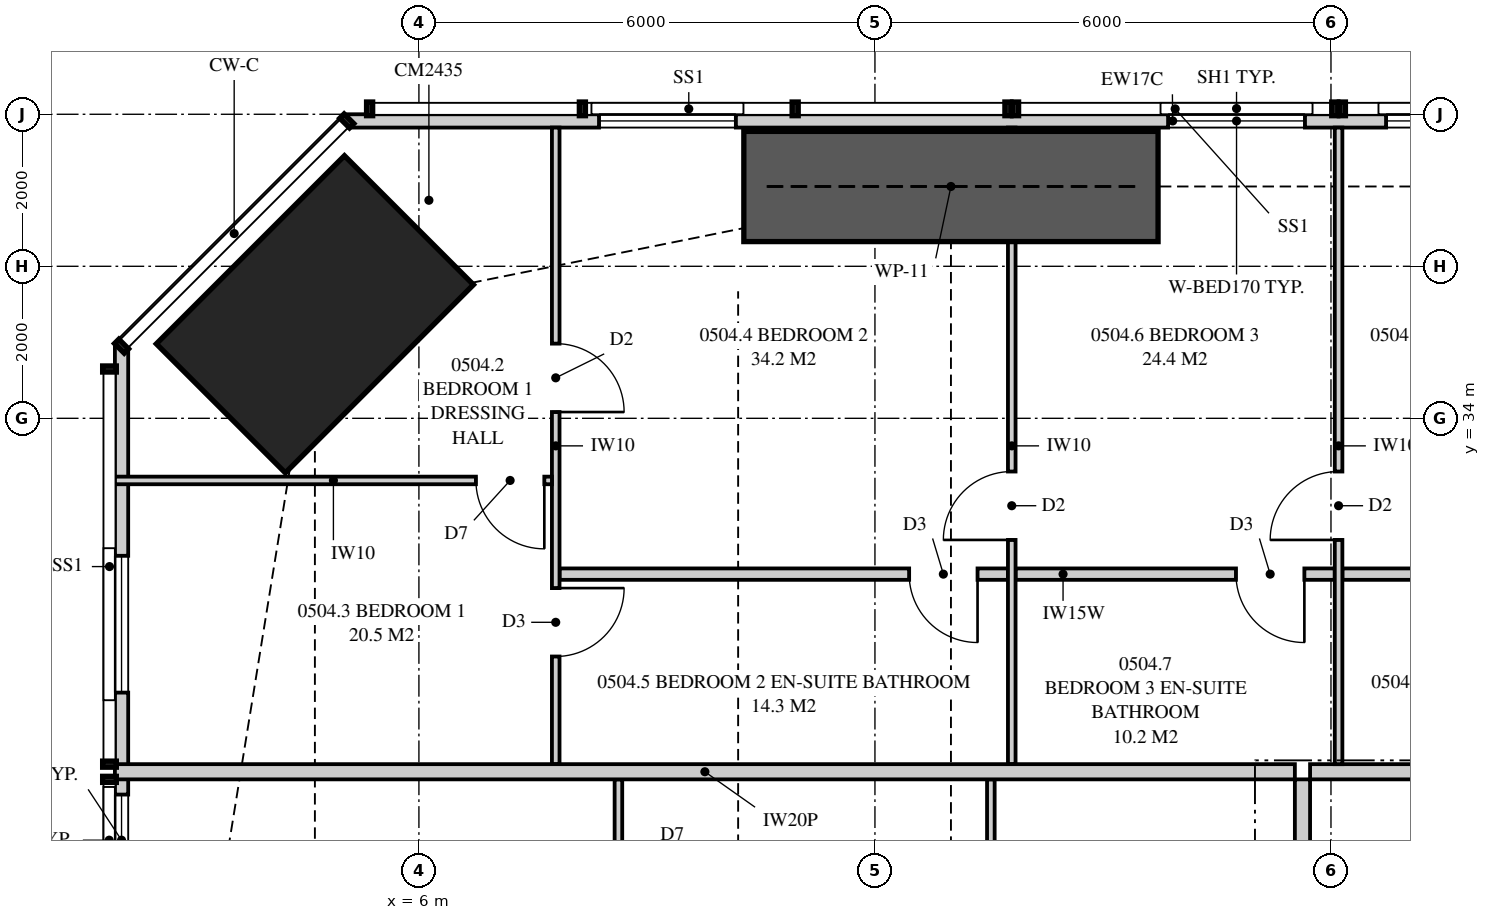
"""IFC4 building model, lengths in metres.
Left out: names, types, materials, properties, quantities, classifications, styles, units other than length and angle.
Written with IfcOpenShell. Run it as: python <this file> out.ifc"""

import sys

from ifc_helpers import new_model, si_unit, direction, frame, frame_2d, origin, origin_2d, place, context, subcontext, project, spatial, polyline, rectangle, outline, extrude, element, fill, save


model = new_model("IFC4")
c1 = context("Model", 3, precision=1e-05, world=origin(), true_north=direction((0.0, 1.0)))
c2 = subcontext(c1, "Body", "Model", "MODEL_VIEW")
j1 = project(units=[si_unit("LENGTHUNIT", "METRE"), si_unit("PLANEANGLEUNIT", "RADIAN")], contexts=[c1])
p1 = place(None, origin())
s1 = spatial("IfcSite", under=j1, at=p1, CompositionType="ELEMENT")
p2 = place(p1, origin())
s2 = spatial("IfcBuilding", under=s1, at=p2, CompositionType="ELEMENT")
p3 = place(p2, frame((0.0, 0.0, 24.35)))
s3 = spatial("IfcBuildingStorey", under=s2, at=p3, CompositionType="ELEMENT", Elevation=24.35)
p4 = place(p3, frame((4.631, 35.369, 0.0), z_axis=(0.0, 0.0, 1.0), x_axis=(0.707106781187, -0.707106781187, 0.0)))
e1 = element("IfcColumn", 1, at=p4, inside=s3, PredefinedType="COLUMN", context=c2, shape_type="SweptSolid", body=[
    extrude(rectangle(XDim=2.4, YDim=3.5, at=origin_2d()), origin(), (0.0, 0.0, 1.0), 3.35),
])
p5 = place(p3, frame((26.783, 37.913, 0.0), z_axis=(0.0, 0.0, 1.0), x_axis=(-1.0, 0.0, 0.0)))
e2 = element("IfcWall", 2, at=p5, inside=s3, PredefinedType="SOLIDWALL", context=c2, shape_type="SweptSolid", body=[
    extrude(outline(polyline([(0.0, 0.0), (21.732, 0.0), (21.732, 3.11), (13.987, 3.11), (13.987, 2.15), (13.939, 2.15), (13.939, 3.11), (13.783, 3.11), (13.783, 2.15), (0.0, 2.15), (0.0, 0.0)])), frame((0.0, 0.087, 0.0), z_axis=(0.0, -1.0, 0.0), x_axis=(1.0, 0.0, 0.0)), (0.0, 0.0, 1.0), 0.175),
])
p6 = place(p5, frame((6.258, 0.0, 0.4)))
e3 = element("IfcOpeningElement", 3, at=p6, cuts=e2, PredefinedType="OPENING", context=c2, shape_type="SweptSolid", body=[
    extrude(rectangle(XDim=1.8, YDim=1.7, at=frame_2d((0.9, 0.85))), frame((0.0, 0.097, 0.0), z_axis=(0.0, -1.0, 0.0), x_axis=(1.0, 0.0, 0.0)), (0.0, 0.0, 1.0), 0.195),
])
p7 = place(p5, frame((9.126, 0.0, 0.4)))
e4 = element("IfcOpeningElement", 4, at=p7, cuts=e2, PredefinedType="OPENING", context=c2, shape_type="SweptSolid", body=[
    extrude(rectangle(XDim=1.8, YDim=1.7, at=frame_2d((0.9, 0.85))), frame((0.0, 0.097, 0.0), z_axis=(0.0, -1.0, 0.0), x_axis=(1.0, 0.0, 0.0)), (0.0, 0.0, 1.0), 0.195),
])
p8 = place(p5, frame((16.613, 0.0, 0.4)))
e5 = element("IfcOpeningElement", 5, at=p8, cuts=e2, PredefinedType="OPENING", context=c2, shape_type="SweptSolid", body=[
    extrude(rectangle(XDim=1.8, YDim=1.7, at=frame_2d((0.9, 0.85))), frame((0.0, 0.097, 0.0), z_axis=(0.0, -1.0, 0.0), x_axis=(1.0, 0.0, 0.0)), (0.0, 0.0, 1.0), 0.195),
])
p9 = place(p3, frame((2.087, 34.949, 0.0), z_axis=(0.0, 0.0, 1.0), x_axis=(0.0, -1.0, 0.0)))
e6 = element("IfcWall", 6, at=p9, inside=s3, PredefinedType="SOLIDWALL", context=c2, shape_type="SweptSolid", body=[
    extrude(outline(polyline([(0.0, 0.0), (14.557, 0.0), (14.557, 2.15), (9.949, 2.15), (9.949, 3.11), (9.823, 3.11), (9.823, 2.15), (9.73, 2.15), (9.73, 3.11), (0.0, 3.11), (0.0, 0.0)])), frame((0.0, 0.087, 0.0), z_axis=(0.0, -1.0, 0.0), x_axis=(1.0, 0.0, 0.0)), (0.0, 0.0, 1.0), 0.175),
])
p10 = place(p9, frame((2.757, 0.0, 0.4)))
e7 = element("IfcOpeningElement", 7, at=p10, cuts=e6, PredefinedType="OPENING", context=c2, shape_type="SweptSolid", body=[
    extrude(rectangle(XDim=1.8, YDim=1.7, at=frame_2d((0.9, 0.85))), frame((0.0, 0.097, 0.0), z_axis=(0.0, -1.0, 0.0), x_axis=(1.0, 0.0, 0.0)), (0.0, 0.0, 1.0), 0.195),
])
p11 = place(p9, frame((5.899, 0.0, 0.4)))
e8 = element("IfcOpeningElement", 8, at=p11, cuts=e6, PredefinedType="OPENING", context=c2, shape_type="SweptSolid", body=[
    extrude(rectangle(XDim=1.2, YDim=1.7, at=frame_2d((0.6, 0.85))), frame((0.0, 0.097, 0.0), z_axis=(0.0, -1.0, 0.0), x_axis=(1.0, 0.0, 0.0)), (0.0, 0.0, 1.0), 0.195),
])
p12 = place(p3, frame((17.725, 29.35, 0.0), z_axis=(0.0, 0.0, 1.0), x_axis=(1.0, 0.0, 0.0)))
e9 = element("IfcWall", 9, at=p12, inside=s3, PredefinedType="PARTITIONING", context=c2, shape_type="SweptSolid", body=[
    extrude(rectangle(XDim=3.525, YDim=0.2, at=frame_2d((1.762, 0.0))), origin(), (0.0, 0.0, 1.0), 3.11),
])
p13 = place(p3, frame((7.8, 37.825, 0.0), z_axis=(0.0, 0.0, 1.0), x_axis=(0.0, -1.0, 0.0)))
e10 = element("IfcWall", 10, at=p13, inside=s3, PredefinedType="PARTITIONING", context=c2, shape_type="SweptSolid", body=[
    extrude(outline(polyline([(0.0, 0.0), (8.375, 0.0), (8.375, 3.11), (2.697, 3.11), (2.697, 2.15), (0.943, 2.15), (0.943, 3.11), (0.0, 3.11), (0.0, 0.0)])), frame((0.0, 0.05, 0.0), z_axis=(0.0, -1.0, 0.0), x_axis=(1.0, 0.0, 0.0)), (0.0, 0.0, 1.0), 0.1),
])
p14 = place(p13, frame((2.842, 0.0, 0.0)))
e11 = element("IfcOpeningElement", 11, at=p14, cuts=e10, PredefinedType="OPENING", context=c2, shape_type="SweptSolid", body=[
    extrude(rectangle(XDim=0.9, YDim=2.1, at=frame_2d((0.45, 1.05))), frame((0.0, 0.06, 0.0), z_axis=(0.0, -1.0, 0.0), x_axis=(1.0, 0.0, 0.0)), (0.0, 0.0, 1.0), 0.12),
])
p15 = place(p13, frame((6.059, 0.0, 0.0)))
e12 = element("IfcOpeningElement", 12, at=p15, cuts=e10, PredefinedType="OPENING", context=c2, shape_type="SweptSolid", body=[
    extrude(rectangle(XDim=0.9, YDim=2.1, at=frame_2d((0.45, 1.05))), frame((0.0, 0.06, 0.0), z_axis=(0.0, -1.0, 0.0), x_axis=(1.0, 0.0, 0.0)), (0.0, 0.0, 1.0), 0.12),
])
p16 = place(p3, frame((13.8, 37.825, 0.0), z_axis=(0.0, 0.0, 1.0), x_axis=(0.0, -1.0, 0.0)))
e13 = element("IfcWall", 13, at=p16, inside=s3, PredefinedType="PARTITIONING", context=c2, shape_type="SweptSolid", body=[
    extrude(outline(polyline([(1.635, 2.15), (0.0, 2.15), (0.0, 0.0), (8.375, 0.0), (8.375, 3.11), (1.635, 3.11), (1.635, 2.15)]), holes=[polyline([(1.021, 0.126), (0.529, 0.126), (0.529, 0.919), (1.021, 0.919), (1.021, 0.126)]), polyline([(1.021, 1.231), (0.529, 1.231), (0.529, 2.024), (1.021, 2.024), (1.021, 1.231)])]), frame((0.0, 0.05, 0.0), z_axis=(0.0, -1.0, 0.0), x_axis=(1.0, 0.0, 0.0)), (0.0, 0.0, 1.0), 0.1),
])
p17 = place(p16, frame((4.525, 0.0, 0.0)))
e14 = element("IfcOpeningElement", 14, at=p17, cuts=e13, PredefinedType="OPENING", context=c2, shape_type="SweptSolid", body=[
    extrude(rectangle(XDim=0.9, YDim=2.1, at=frame_2d((0.45, 1.05))), frame((0.0, 0.06, 0.0), z_axis=(0.0, -1.0, 0.0), x_axis=(1.0, 0.0, 0.0)), (0.0, 0.0, 1.0), 0.12),
])
p18 = place(p3, frame((18.1, 37.825, 0.0), z_axis=(0.0, 0.0, 1.0), x_axis=(0.0, -1.0, 0.0)))
e15 = element("IfcWall", 15, at=p18, inside=s3, PredefinedType="PARTITIONING", context=c2, shape_type="SweptSolid", body=[
    extrude(outline(polyline([(0.0, 0.0), (8.375, 0.0), (8.375, 3.11), (1.635, 3.11), (1.635, 2.15), (0.0, 2.15), (0.0, 3.11), (0.0, 0.0)])), frame((0.0, 0.05, 0.0), z_axis=(0.0, -1.0, 0.0), x_axis=(1.0, 0.0, 0.0)), (0.0, 0.0, 1.0), 0.1),
])
p19 = place(p18, frame((4.525, 0.0, 0.0)))
e16 = element("IfcOpeningElement", 16, at=p19, cuts=e15, PredefinedType="OPENING", context=c2, shape_type="SweptSolid", body=[
    extrude(rectangle(XDim=0.9, YDim=2.1, at=frame_2d((0.45, 1.05))), frame((0.0, 0.06, 0.0), z_axis=(0.0, -1.0, 0.0), x_axis=(1.0, 0.0, 0.0)), (0.0, 0.0, 1.0), 0.12),
])
p20 = place(p3, frame((2.0, 33.183, 0.0), z_axis=(0.0, 0.0, 1.0), x_axis=(1.0, 0.0, 0.0)))
e17 = element("IfcWall", 17, at=p20, inside=s3, PredefinedType="PARTITIONING", context=c2, shape_type="SweptSolid", body=[
    extrude(outline(polyline([(0.0, 0.0), (5.75, 0.0), (5.75, 3.11), (3.148, 3.11), (3.148, 2.15), (1.406, 2.15), (1.406, 3.11), (0.0, 3.11), (0.0, 0.0)])), frame((0.0, 0.05, 0.0), z_axis=(0.0, -1.0, 0.0), x_axis=(1.0, 0.0, 0.0)), (0.0, 0.0, 1.0), 0.1),
])
p21 = place(p20, frame((4.75, 0.0, 0.0)))
e18 = element("IfcOpeningElement", 18, at=p21, cuts=e17, PredefinedType="OPENING", context=c2, shape_type="SweptSolid", body=[
    extrude(rectangle(XDim=0.9, YDim=2.1, at=frame_2d((0.45, 1.05))), frame((0.0, 0.06, 0.0), z_axis=(0.0, -1.0, 0.0), x_axis=(1.0, 0.0, 0.0)), (0.0, 0.0, 1.0), 0.12),
])
p22 = place(p3, frame((7.85, 31.95, 0.0), z_axis=(0.0, 0.0, 1.0), x_axis=(1.0, 0.0, 0.0)))
e19 = element("IfcWall", 19, at=p22, inside=s3, PredefinedType="PLUMBINGWALL", context=c2, shape_type="SweptSolid", body=[
    extrude(outline(polyline([(0.0, 0.0), (5.9, 0.0), (5.9, 3.11), (5.462, 3.11), (5.462, 2.541), (4.838, 2.541), (4.838, 3.11), (3.635, 3.11), (3.635, 2.51), (1.065, 2.51), (1.065, 3.11), (0.0, 3.11), (0.0, 0.0)])), frame((0.0, 0.075, 0.0), z_axis=(0.0, -1.0, 0.0), x_axis=(1.0, 0.0, 0.0)), (0.0, 0.0, 1.0), 0.15),
])
p23 = place(p22, frame((4.6, 0.0, 0.0)))
e20 = element("IfcOpeningElement", 20, at=p23, cuts=e19, PredefinedType="OPENING", context=c2, shape_type="SweptSolid", body=[
    extrude(rectangle(XDim=0.9, YDim=2.1, at=frame_2d((0.45, 1.05))), frame((0.0, 0.085, 0.0), z_axis=(0.0, -1.0, 0.0), x_axis=(1.0, 0.0, 0.0)), (0.0, 0.0, 1.0), 0.17),
])
p24 = place(p3, frame((13.85, 31.95, 0.0), z_axis=(0.0, 0.0, 1.0), x_axis=(1.0, 0.0, 0.0)))
e21 = element("IfcWall", 21, at=p24, inside=s3, PredefinedType="PLUMBINGWALL", context=c2, shape_type="SweptSolid", body=[
    extrude(rectangle(XDim=4.2, YDim=0.15, at=frame_2d((2.1, 0.0))), origin(), (0.0, 0.0, 1.0), 3.11),
])
p25 = place(p24, frame((2.9, 0.0, 0.0)))
e22 = element("IfcOpeningElement", 22, at=p25, cuts=e21, PredefinedType="OPENING", context=c2, shape_type="SweptSolid", body=[
    extrude(rectangle(XDim=0.9, YDim=2.1, at=frame_2d((0.45, 1.05))), frame((0.0, 0.085, 0.0), z_axis=(0.0, -1.0, 0.0), x_axis=(1.0, 0.0, 0.0)), (0.0, 0.0, 1.0), 0.17),
])
p26 = place(p3, frame((18.15, 31.95, 0.0), z_axis=(0.0, 0.0, 1.0), x_axis=(1.0, 0.0, 0.0)))
e23 = element("IfcWall", 23, at=p26, inside=s3, PredefinedType="PLUMBINGWALL", context=c2, shape_type="SweptSolid", body=[
    extrude(rectangle(XDim=2.95, YDim=0.15, at=frame_2d((1.475, 0.0))), origin(), (0.0, 0.0, 1.0), 3.11),
])
p27 = place(p3, frame((2.0, 29.35, 0.0), z_axis=(0.0, 0.0, 1.0), x_axis=(1.0, 0.0, 0.0)))
e24 = element("IfcWall", 24, at=p27, inside=s3, PredefinedType="PARTITIONING", context=c2, shape_type="SweptSolid", body=[
    extrude(outline(polyline([(0.0, 0.0), (15.525, 0.0), (15.525, 3.11), (11.337, 3.11), (11.337, 2.541), (10.663, 2.541), (10.663, 3.11), (9.51, 3.11), (9.51, 2.51), (6.89, 2.51), (6.89, 3.11), (2.969, 3.11), (2.969, 2.541), (2.577, 2.541), (2.577, 2.15), (0.733, 2.15), (0.733, 3.11), (0.0, 3.11), (0.0, 0.0)])), frame((0.0, 0.1, 0.0), z_axis=(0.0, -1.0, 0.0), x_axis=(1.0, 0.0, 0.0)), (0.0, 0.0, 1.0), 0.2),
])
p28 = place(p3, frame((13.525, 11.3, 0.0), z_axis=(0.0, 0.0, 1.0), x_axis=(0.0, 1.0, 0.0)))
e25 = element("IfcWall", 25, at=p28, inside=s3, PredefinedType="PARTITIONING", context=c2, shape_type="SweptSolid", body=[
    extrude(outline(polyline([(0.0, 0.0), (17.95, 0.0), (17.95, 3.11), (13.987, 3.11), (13.987, 2.541), (13.413, 2.541), (13.413, 3.11), (1.987, 3.11), (1.987, 2.541), (1.413, 2.541), (1.413, 3.11), (0.0, 3.11), (0.0, 0.0)])), frame((0.0, 0.05, 0.0), z_axis=(0.0, -1.0, 0.0), x_axis=(1.0, 0.0, 0.0)), (0.0, 0.0, 1.0), 0.1),
])
p29 = place(p28, frame((6.7, 0.0, 0.0)))
e26 = element("IfcOpeningElement", 26, at=p29, cuts=e25, PredefinedType="OPENING", context=c2, shape_type="SweptSolid", body=[
    extrude(rectangle(XDim=1.0, YDim=2.1, at=frame_2d((0.5, 1.05))), frame((0.0, 0.06, 0.0), z_axis=(0.0, -1.0, 0.0), x_axis=(1.0, 0.0, 0.0)), (0.0, 0.0, 1.0), 0.12),
])
p30 = place(p3, frame((17.625, 19.9, 0.0), z_axis=(0.0, 0.0, 1.0), x_axis=(0.0, 1.0, 0.0)))
e27 = element("IfcWall", 27, at=p30, inside=s3, PredefinedType="PARTITIONING", context=c2, shape_type="SweptSolid", body=[
    extrude(outline(polyline([(0.0, 0.0), (9.35, 0.0), (9.35, 3.11), (5.437, 3.11), (5.437, 2.541), (4.763, 2.541), (4.763, 3.11), (0.0, 3.11), (0.0, 0.0)])), frame((0.0, 0.1, 0.0), z_axis=(0.0, -1.0, 0.0), x_axis=(1.0, 0.0, 0.0)), (0.0, 0.0, 1.0), 0.2),
])
p31 = place(p3, frame((8.625, 23.317, 0.0), z_axis=(0.0, 0.0, 1.0), x_axis=(0.0, 1.0, 0.0)))
e28 = element("IfcWall", 28, at=p31, inside=s3, PredefinedType="PARTITIONING", context=c2, shape_type="SweptSolid", body=[
    extrude(outline(polyline([(0.0, 0.0), (5.933, 0.0), (5.933, 3.11), (1.971, 3.11), (1.971, 2.541), (1.396, 2.541), (1.396, 3.11), (0.0, 3.11), (0.0, 0.0)])), frame((0.0, 0.05, 0.0), z_axis=(0.0, -1.0, 0.0), x_axis=(1.0, 0.0, 0.0)), (0.0, 0.0, 1.0), 0.1),
])
p32 = place(p31, frame((0.15, 0.0, 0.0)))
e29 = element("IfcOpeningElement", 29, at=p32, cuts=e28, PredefinedType="OPENING", context=c2, shape_type="SweptSolid", body=[
    extrude(rectangle(XDim=0.9, YDim=2.1, at=frame_2d((0.45, 1.05))), frame((0.0, 0.06, 0.0), z_axis=(0.0, -1.0, 0.0), x_axis=(1.0, 0.0, 0.0)), (0.0, 0.0, 1.0), 0.12),
])
p33 = place(p31, frame((4.042, 0.0, 0.0)))
e30 = element("IfcOpeningElement", 30, at=p33, cuts=e28, PredefinedType="OPENING", context=c2, shape_type="SweptSolid", body=[
    extrude(rectangle(XDim=0.9, YDim=2.1, at=frame_2d((0.45, 1.05))), frame((0.0, 0.06, 0.0), z_axis=(0.0, -1.0, 0.0), x_axis=(1.0, 0.0, 0.0)), (0.0, 0.0, 1.0), 0.12),
])
p34 = place(p3, frame((10.275, 37.05, 0.0), z_axis=(0.0, 0.0, 1.0), x_axis=(1.0, 0.0, 0.0)))
e31 = element("IfcWall", 31, at=p34, inside=s3, PredefinedType="SHEAR", context=c2, shape_type="SweptSolid", body=[
    extrude(rectangle(XDim=5.45, YDim=1.45, at=frame_2d((2.725, 0.0))), origin(), (0.0, 0.0, 1.0), 3.35),
])
p35 = place(p6, origin())
e32 = element("IfcWindow", 32, at=p35, inside=s3, PartitioningType="SINGLE_PANEL", PredefinedType="WINDOW", context=c2, shape_type="SweptSolid", body=[
    extrude(rectangle(XDim=1.8, YDim=1.7, at=frame_2d((0.9, 0.85))), frame((0.0, 0.03, 0.0), z_axis=(0.0, -1.0, 0.0), x_axis=(1.0, 0.0, 0.0)), (0.0, 0.0, 1.0), 0.06),
])
fill(e3, e32)
p36 = place(p7, origin())
e33 = element("IfcWindow", 33, at=p36, inside=s3, PartitioningType="SINGLE_PANEL", PredefinedType="WINDOW", context=c2, shape_type="SweptSolid", body=[
    extrude(rectangle(XDim=1.8, YDim=1.7, at=frame_2d((0.9, 0.85))), frame((0.0, 0.03, 0.0), z_axis=(0.0, -1.0, 0.0), x_axis=(1.0, 0.0, 0.0)), (0.0, 0.0, 1.0), 0.06),
])
fill(e4, e33)
p37 = place(p8, origin())
e34 = element("IfcWindow", 34, at=p37, inside=s3, PartitioningType="SINGLE_PANEL", PredefinedType="WINDOW", context=c2, shape_type="SweptSolid", body=[
    extrude(rectangle(XDim=1.8, YDim=1.7, at=frame_2d((0.9, 0.85))), frame((0.0, 0.03, 0.0), z_axis=(0.0, -1.0, 0.0), x_axis=(1.0, 0.0, 0.0)), (0.0, 0.0, 1.0), 0.06),
])
fill(e5, e34)
p38 = place(p10, origin())
e35 = element("IfcWindow", 35, at=p38, inside=s3, PartitioningType="SINGLE_PANEL", PredefinedType="WINDOW", context=c2, shape_type="SweptSolid", body=[
    extrude(rectangle(XDim=1.8, YDim=1.7, at=frame_2d((0.9, 0.85))), frame((0.0, 0.03, 0.0), z_axis=(0.0, -1.0, 0.0), x_axis=(1.0, 0.0, 0.0)), (0.0, 0.0, 1.0), 0.06),
])
fill(e7, e35)
p39 = place(p11, origin())
e36 = element("IfcWindow", 36, at=p39, inside=s3, PartitioningType="SINGLE_PANEL", PredefinedType="WINDOW", context=c2, shape_type="SweptSolid", body=[
    extrude(rectangle(XDim=1.2, YDim=1.7, at=frame_2d((0.6, 0.85))), frame((0.0, 0.03, 0.0), z_axis=(0.0, -1.0, 0.0), x_axis=(1.0, 0.0, 0.0)), (0.0, 0.0, 1.0), 0.06),
])
fill(e8, e36)
p40 = place(p21, frame((0.9, 0.0, 0.0), z_axis=(0.0, 0.0, 1.0), x_axis=(-1.0, 0.0, 0.0)))
e37 = element("IfcDoor", 37, at=p40, inside=s3, OperationType="SINGLE_SWING_LEFT", PredefinedType="DOOR", context=c2, shape_type="SweptSolid", body=[
    extrude(rectangle(XDim=0.9, YDim=2.1, at=frame_2d((0.45, 1.05))), frame((0.0, 0.025, 0.0), z_axis=(0.0, -1.0, 0.0), x_axis=(1.0, 0.0, 0.0)), (0.0, 0.0, 1.0), 0.05),
])
fill(e18, e37)
p41 = place(p14, origin())
e38 = element("IfcDoor", 38, at=p41, inside=s3, OperationType="SINGLE_SWING_RIGHT", PredefinedType="DOOR", context=c2, shape_type="SweptSolid", body=[
    extrude(rectangle(XDim=0.9, YDim=2.1, at=frame_2d((0.45, 1.05))), frame((0.0, 0.025, 0.0), z_axis=(0.0, -1.0, 0.0), x_axis=(1.0, 0.0, 0.0)), (0.0, 0.0, 1.0), 0.05),
])
fill(e11, e38)
p42 = place(p17, frame((0.9, 0.0, 0.0), z_axis=(0.0, 0.0, 1.0), x_axis=(-1.0, 0.0, 0.0)))
e39 = element("IfcDoor", 39, at=p42, inside=s3, OperationType="SINGLE_SWING_LEFT", PredefinedType="DOOR", context=c2, shape_type="SweptSolid", body=[
    extrude(rectangle(XDim=0.9, YDim=2.1, at=frame_2d((0.45, 1.05))), frame((0.0, 0.025, 0.0), z_axis=(0.0, -1.0, 0.0), x_axis=(1.0, 0.0, 0.0)), (0.0, 0.0, 1.0), 0.05),
])
fill(e14, e39)
p43 = place(p23, frame((0.9, 0.0, 0.0), z_axis=(0.0, 0.0, 1.0), x_axis=(-1.0, 0.0, 0.0)))
e40 = element("IfcDoor", 40, at=p43, inside=s3, OperationType="SINGLE_SWING_LEFT", PredefinedType="DOOR", context=c2, shape_type="SweptSolid", body=[
    extrude(rectangle(XDim=0.9, YDim=2.1, at=frame_2d((0.45, 1.05))), frame((0.0, 0.025, 0.0), z_axis=(0.0, -1.0, 0.0), x_axis=(1.0, 0.0, 0.0)), (0.0, 0.0, 1.0), 0.05),
])
fill(e20, e40)
p44 = place(p19, frame((0.9, 0.0, 0.0), z_axis=(0.0, 0.0, 1.0), x_axis=(-1.0, 0.0, 0.0)))
e41 = element("IfcDoor", 41, at=p44, inside=s3, OperationType="SINGLE_SWING_LEFT", PredefinedType="DOOR", context=c2, shape_type="SweptSolid", body=[
    extrude(rectangle(XDim=0.9, YDim=2.1, at=frame_2d((0.45, 1.05))), frame((0.0, 0.025, 0.0), z_axis=(0.0, -1.0, 0.0), x_axis=(1.0, 0.0, 0.0)), (0.0, 0.0, 1.0), 0.05),
])
fill(e16, e41)
p45 = place(p25, frame((0.9, 0.0, 0.0), z_axis=(0.0, 0.0, 1.0), x_axis=(-1.0, 0.0, 0.0)))
e42 = element("IfcDoor", 42, at=p45, inside=s3, OperationType="SINGLE_SWING_LEFT", PredefinedType="DOOR", context=c2, shape_type="SweptSolid", body=[
    extrude(rectangle(XDim=0.9, YDim=2.1, at=frame_2d((0.45, 1.05))), frame((0.0, 0.025, 0.0), z_axis=(0.0, -1.0, 0.0), x_axis=(1.0, 0.0, 0.0)), (0.0, 0.0, 1.0), 0.05),
])
fill(e22, e42)
p46 = place(p15, origin())
e43 = element("IfcDoor", 43, at=p46, inside=s3, OperationType="SINGLE_SWING_LEFT", PredefinedType="DOOR", context=c2, shape_type="SweptSolid", body=[
    extrude(rectangle(XDim=0.9, YDim=2.1, at=frame_2d((0.45, 1.05))), frame((0.0, 0.025, 0.0), z_axis=(0.0, -1.0, 0.0), x_axis=(1.0, 0.0, 0.0)), (0.0, 0.0, 1.0), 0.05),
])
fill(e12, e43)
save(model, sys.argv[1])
